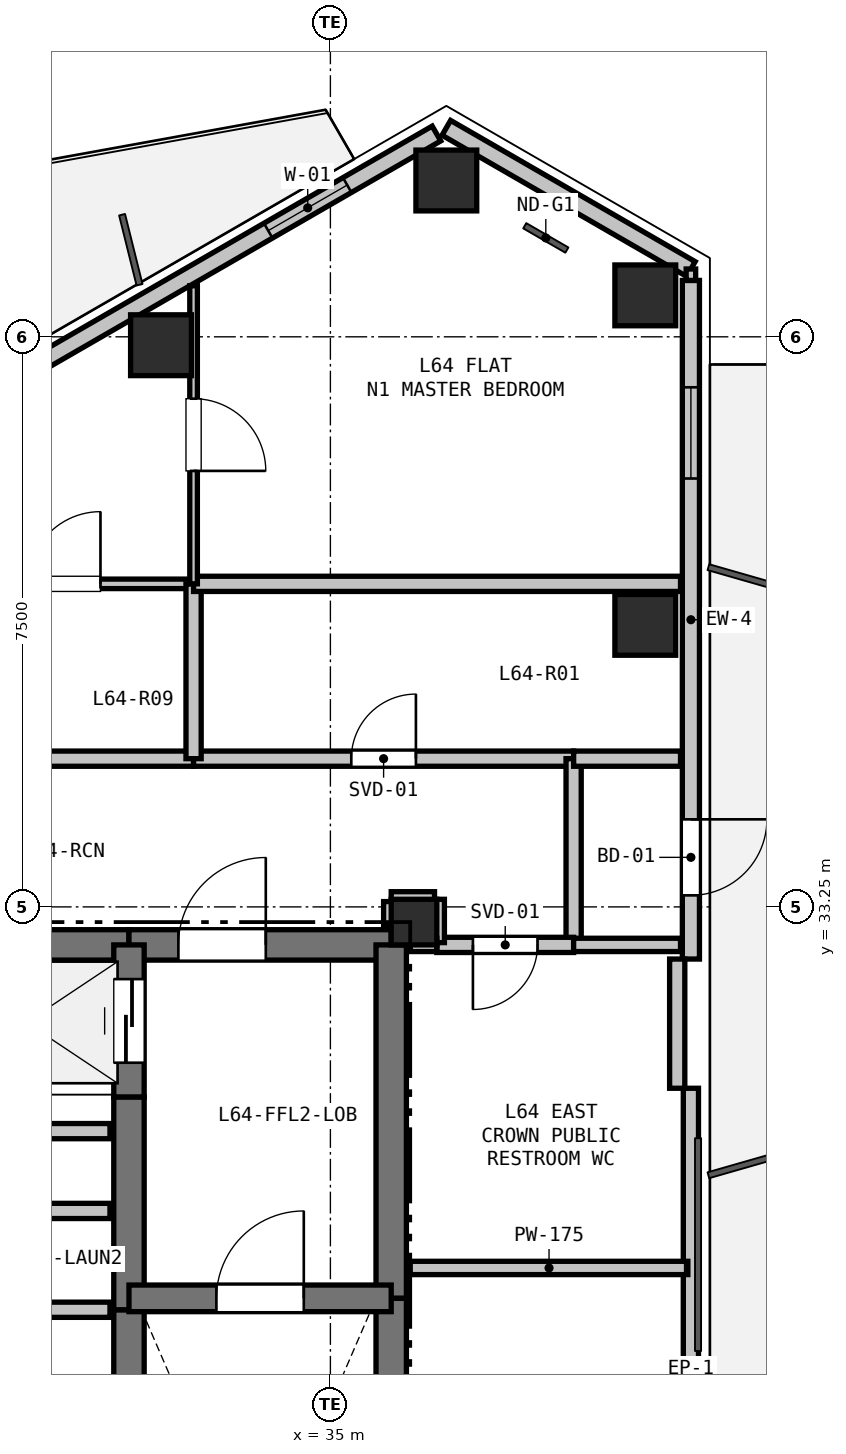
"""IFC4 building model, lengths in metres.
Left out: names, types, materials, properties, quantities, classifications, styles, units other than length and angle.
Written with IfcOpenShell. Run it as: python <this file> out.ifc"""

import sys

from ifc_helpers import new_model, si_unit, direction, frame, frame_2d, origin, origin_2d, place, context, subcontext, project, spatial, rectangle, hollow_rectangle, extrude, element, fill, save


model = new_model("IFC4")
c1 = context("Model", 3, precision=1e-05, world=origin(), true_north=direction((0.0, 1.0)))
c2 = subcontext(c1, "Body", "Model", "MODEL_VIEW")
j1 = project(units=[si_unit("LENGTHUNIT", "METRE"), si_unit("PLANEANGLEUNIT", "RADIAN")], contexts=[c1])
p1 = place(None, origin())
s1 = spatial("IfcSite", under=j1, at=p1, CompositionType="ELEMENT")
p2 = place(p1, origin())
s2 = spatial("IfcBuilding", under=s1, at=p2, CompositionType="ELEMENT")
p3 = place(p2, frame((0.0, 0.0, 229.8)))
s3 = spatial("IfcBuildingStorey", under=s2, at=p3, CompositionType="ELEMENT", Elevation=229.8)
p4 = place(p3, frame((36.1, 33.05, 0.0), z_axis=(0.0, 0.0, 1.0), x_axis=(1.0, 0.0, 0.0)))
e1 = element("IfcColumn", 1, at=p4, inside=s3, PredefinedType="COLUMN", context=c2, shape_type="SweptSolid", body=[
    extrude(rectangle(XDim=0.6, YDim=0.6, at=origin_2d()), origin(), (0.0, 0.0, 1.0), 3.3),
])
for number, where, z_axis, x_axis in (
    (2, (32.771, 40.639, 0.0), (0.0, 0.0, 1.0), (1.0, 0.0, 0.0)),
    (3, (36.525, 42.807, 0.0), (0.0, 0.0, 1.0), (1.0, 0.0, 0.0)),
    (4, (39.143, 41.295, 0.0), (0.0, 0.0, 1.0), (1.0, 0.0, 0.0)),
    (5, (39.143, 36.961, 0.0), (0.0, 0.0, 1.0), (1.0, 0.0, 0.0)),
):
    element("IfcColumn", number, at=place(p3, frame(where, z_axis=z_axis, x_axis=x_axis)), inside=s3, PredefinedType="COLUMN", context=c2, shape_type="SweptSolid", body=[
        extrude(hollow_rectangle(XDim=0.8, YDim=0.8, WallThickness=0.025, at=origin_2d()), origin(), (0.0, 0.0, 1.0), 3.3),
    ])
p5 = place(p3, frame((36.525, 43.5, 0.0), z_axis=(0.0, 0.0, 1.0), x_axis=(0.866038962515, -0.499976514854, 0.0)))
e6 = element("IfcWall", 6, at=p5, inside=s3, PredefinedType="SOLIDWALL", context=c2, shape_type="SweptSolid", body=[
    extrude(rectangle(XDim=3.716, YDim=0.225, at=frame_2d((1.858, 0.0))), origin(), (0.0, 0.0, 1.0), 2.7),
])
p6 = place(p3, frame((28.664, 38.96, 0.0), z_axis=(0.0, 0.0, 1.0), x_axis=(0.866026655105, 0.499997832642, 0.0)))
e7 = element("IfcWall", 7, at=p6, inside=s3, PredefinedType="SOLIDWALL", context=c2, shape_type="SweptSolid", body=[
    extrude(rectangle(XDim=8.928, YDim=0.225, at=frame_2d((4.464, 0.0))), origin(), (0.0, 0.0, 1.0), 2.7),
])
p7 = place(p6, frame((6.372, 0.0, 0.9)))
e8 = element("IfcOpeningElement", 8, at=p7, cuts=e7, PredefinedType="OPENING", context=c2, shape_type="SweptSolid", body=[
    extrude(rectangle(XDim=1.2, YDim=1.4, at=frame_2d((0.6, 0.7))), frame((0.0, 0.123, 0.0), z_axis=(0.0, -1.0, 0.0), x_axis=(1.0, 0.0, 0.0)), (0.0, 0.0, 1.0), 0.245),
])
p8 = place(p3, frame((39.743, 41.492, 0.0), z_axis=(0.0, 0.0, 1.0), x_axis=(0.0, -1.0, 0.0)))
e9 = element("IfcWall", 9, at=p8, inside=s3, PredefinedType="SOLIDWALL", context=c2, shape_type="SweptSolid", body=[
    extrude(rectangle(XDim=8.928, YDim=0.225, at=frame_2d((4.464, 0.0))), origin(), (0.0, 0.0, 1.0), 2.7),
])
p9 = place(p8, frame((7.09, 0.0, 0.0)))
e10 = element("IfcOpeningElement", 10, at=p9, cuts=e9, PredefinedType="OPENING", context=c2, shape_type="SweptSolid", body=[
    extrude(rectangle(XDim=1.0, YDim=2.1, at=frame_2d((0.5, 1.05))), frame((0.0, 0.123, 0.0), z_axis=(0.0, -1.0, 0.0), x_axis=(1.0, 0.0, 0.0)), (0.0, 0.0, 1.0), 0.245),
])
p10 = place(p8, frame((1.406, 0.0, 0.9)))
e11 = element("IfcOpeningElement", 11, at=p10, cuts=e9, PredefinedType="OPENING", context=c2, shape_type="SweptSolid", body=[
    extrude(rectangle(XDim=1.2, YDim=1.4, at=frame_2d((0.6, 0.7))), frame((0.0, 0.123, 0.0), z_axis=(0.0, -1.0, 0.0), x_axis=(1.0, 0.0, 0.0)), (0.0, 0.0, 1.0), 0.245),
])
p11 = place(p3, frame((39.743, 30.864, 0.0), z_axis=(0.0, 0.0, 1.0), x_axis=(0.0, -1.0, 0.0)))
e12 = element("IfcWall", 12, at=p11, inside=s3, PredefinedType="PARAPET", context=c2, shape_type="SweptSolid", body=[
    extrude(rectangle(XDim=8.228, YDim=0.2, at=frame_2d((4.114, 0.0))), origin(), (0.0, 0.0, 1.0), 0.2),
])
p12 = place(p3, frame((39.563, 32.564, 0.0), z_axis=(0.0, 0.0, 1.0), x_axis=(0.0, -1.0, 0.0)))
e13 = element("IfcWall", 13, at=p12, inside=s3, PredefinedType="PARAPET", context=c2, shape_type="SweptSolid", body=[
    extrude(rectangle(XDim=1.7, YDim=0.2, at=frame_2d((0.85, 0.0))), origin(), (0.0, 0.0, 1.0), 2.7),
])
p13 = place(p3, frame((29.65, 32.75, 0.0), z_axis=(0.0, 0.0, 1.0), x_axis=(1.0, 0.0, 0.0)))
e14 = element("IfcWall", 14, at=p13, inside=s3, PredefinedType="SHEAR", context=c2, shape_type="SweptSolid", body=[
    extrude(rectangle(XDim=2.7, YDim=0.4, at=frame_2d((1.35, 0.0))), origin(), (0.0, 0.0, 1.0), 3.08),
])
p14 = place(p3, frame((32.35, 32.75, 0.0), z_axis=(0.0, 0.0, 1.0), x_axis=(1.0, 0.0, 0.0)))
e15 = element("IfcWall", 15, at=p14, inside=s3, PredefinedType="SHEAR", context=c2, shape_type="SweptSolid", body=[
    extrude(rectangle(XDim=3.45, YDim=0.4, at=frame_2d((1.725, 0.0))), origin(), (0.0, 0.0, 1.0), 3.08),
])
p15 = place(p14, frame((0.65, 0.0, 0.0)))
e16 = element("IfcOpeningElement", 16, at=p15, cuts=e15, PredefinedType="OPENING", context=c2, shape_type="SweptSolid", body=[
    extrude(rectangle(XDim=1.15, YDim=2.15, at=frame_2d((0.575, 1.075))), frame((0.0, 0.21, 0.0), z_axis=(0.0, -1.0, 0.0), x_axis=(1.0, 0.0, 0.0)), (0.0, 0.0, 1.0), 0.42),
])
p16 = place(p3, frame((35.8, 32.75, 0.0), z_axis=(0.0, 0.0, 1.0), x_axis=(0.0, -1.0, 0.0)))
e17 = element("IfcWall", 17, at=p16, inside=s3, PredefinedType="SHEAR", context=c2, shape_type="SweptSolid", body=[
    extrude(rectangle(XDim=4.65, YDim=0.4, at=frame_2d((2.325, 0.0))), origin(), (0.0, 0.0, 1.0), 3.08),
])
p17 = place(p3, frame((35.8, 28.1, 0.0), z_axis=(0.0, 0.0, 1.0), x_axis=(0.0, -1.0, 0.0)))
e18 = element("IfcWall", 18, at=p17, inside=s3, PredefinedType="SHEAR", context=c2, shape_type="SweptSolid", body=[
    extrude(rectangle(XDim=7.35, YDim=0.4, at=frame_2d((3.675, 0.0))), origin(), (0.0, 0.0, 1.0), 3.08),
])
p18 = place(p3, frame((32.35, 25.55, 0.0), z_axis=(0.0, 0.0, 1.0), x_axis=(0.0, 1.0, 0.0)))
e19 = element("IfcWall", 19, at=p18, inside=s3, PredefinedType="SHEAR", context=c2, shape_type="SweptSolid", body=[
    extrude(rectangle(XDim=2.4, YDim=0.4, at=frame_2d((1.2, 0.0))), origin(), (0.0, 0.0, 1.0), 3.08),
])
p19 = place(p3, frame((32.35, 27.95, 0.0), z_axis=(0.0, 0.0, 1.0), x_axis=(0.0, 1.0, 0.0)))
e20 = element("IfcWall", 20, at=p19, inside=s3, PredefinedType="SHEAR", context=c2, shape_type="SweptSolid", body=[
    extrude(rectangle(XDim=2.8, YDim=0.4, at=frame_2d((1.4, 0.0))), origin(), (0.0, 0.0, 1.0), 3.08),
])
p20 = place(p3, frame((32.35, 30.75, 0.0), z_axis=(0.0, 0.0, 1.0), x_axis=(0.0, 1.0, 0.0)))
e21 = element("IfcWall", 21, at=p20, inside=s3, PredefinedType="SHEAR", context=c2, shape_type="SweptSolid", body=[
    extrude(rectangle(XDim=2.0, YDim=0.4, at=frame_2d((1.0, 0.0))), origin(), (0.0, 0.0, 1.0), 3.08),
])
p21 = place(p20, frame((0.45, 0.0, 0.0)))
e22 = element("IfcOpeningElement", 22, at=p21, cuts=e21, PredefinedType="OPENING", context=c2, shape_type="SweptSolid", body=[
    extrude(rectangle(XDim=1.1, YDim=2.15, at=frame_2d((0.55, 1.075))), frame((0.0, 0.21, 0.0), z_axis=(0.0, -1.0, 0.0), x_axis=(1.0, 0.0, 0.0)), (0.0, 0.0, 1.0), 0.42),
])
p22 = place(p3, frame((32.35, 28.1, 0.0), z_axis=(0.0, 0.0, 1.0), x_axis=(1.0, 0.0, 0.0)))
e23 = element("IfcWall", 23, at=p22, inside=s3, PredefinedType="SHEAR", context=c2, shape_type="SweptSolid", body=[
    extrude(rectangle(XDim=3.45, YDim=0.35, at=frame_2d((1.725, 0.0))), origin(), (0.0, 0.0, 1.0), 3.08),
])
p23 = place(p22, frame((1.15, 0.0, 0.0)))
e24 = element("IfcOpeningElement", 24, at=p23, cuts=e23, PredefinedType="OPENING", context=c2, shape_type="SweptSolid", body=[
    extrude(rectangle(XDim=1.15, YDim=2.15, at=frame_2d((0.575, 1.075))), frame((0.0, 0.185, 0.0), z_axis=(0.0, -1.0, 0.0), x_axis=(1.0, 0.0, 0.0)), (0.0, 0.0, 1.0), 0.37),
])
p24 = place(p3, frame((32.1, 30.3, 0.0), z_axis=(0.0, 0.0, 1.0), x_axis=(-1.0, 0.0, 0.0)))
e25 = element("IfcWall", 25, at=p24, inside=s3, PredefinedType="PARTITIONING", context=c2, shape_type="SweptSolid", body=[
    extrude(rectangle(XDim=2.45, YDim=0.2, at=frame_2d((1.225, 0.0))), origin(), (0.0, 0.0, 1.0), 3.08),
])
p25 = place(p3, frame((27.4, 27.95, 0.0), z_axis=(0.0, 0.0, 1.0), x_axis=(1.0, 0.0, 0.0)))
e26 = element("IfcWall", 26, at=p25, inside=s3, PredefinedType="PARTITIONING", context=c2, shape_type="SweptSolid", body=[
    extrude(rectangle(XDim=4.7, YDim=0.2, at=frame_2d((2.35, 0.0))), origin(), (0.0, 0.0, 1.0), 3.08),
])
p26 = place(p25, frame((1.85, 0.0, 0.0)))
e27 = element("IfcOpeningElement", 27, at=p26, cuts=e26, PredefinedType="OPENING", context=c2, shape_type="SweptSolid", body=[
    extrude(rectangle(XDim=1.0, YDim=2.15, at=frame_2d((0.5, 1.075))), frame((0.0, 0.11, 0.0), z_axis=(0.0, -1.0, 0.0), x_axis=(1.0, 0.0, 0.0)), (0.0, 0.0, 1.0), 0.22),
])
p27 = place(p3, frame((29.8, 35.2, 0.0), z_axis=(0.0, 0.0, 1.0), x_axis=(1.0, 0.0, 0.0)))
e28 = element("IfcWall", 28, at=p27, inside=s3, PredefinedType="PARTITIONING", context=c2, shape_type="SweptSolid", body=[
    extrude(rectangle(XDim=3.4, YDim=0.2, at=frame_2d((1.7, 0.0))), origin(), (0.0, 0.0, 1.0), 3.08),
])
p28 = place(p3, frame((33.2, 35.2, 0.0), z_axis=(0.0, 0.0, 1.0), x_axis=(1.0, 0.0, 0.0)))
e29 = element("IfcWall", 29, at=p28, inside=s3, PredefinedType="PARTITIONING", context=c2, shape_type="SweptSolid", body=[
    extrude(rectangle(XDim=5.0, YDim=0.2, at=frame_2d((2.5, 0.0))), origin(), (0.0, 0.0, 1.0), 2.528),
])
p29 = place(p28, frame((2.075, 0.0, 0.0)))
e30 = element("IfcOpeningElement", 30, at=p29, cuts=e29, PredefinedType="OPENING", context=c2, shape_type="SweptSolid", body=[
    extrude(rectangle(XDim=0.85, YDim=2.1, at=frame_2d((0.425, 1.05))), frame((0.0, 0.11, 0.0), z_axis=(0.0, -1.0, 0.0), x_axis=(1.0, 0.0, 0.0)), (0.0, 0.0, 1.0), 0.22),
])
p30 = place(p3, frame((38.2, 35.2, 0.0), z_axis=(0.0, 0.0, 1.0), x_axis=(0.0, -1.0, 0.0)))
e31 = element("IfcWall", 31, at=p30, inside=s3, PredefinedType="PARTITIONING", context=c2, shape_type="SweptSolid", body=[
    extrude(rectangle(XDim=2.45, YDim=0.2, at=frame_2d((1.225, 0.0))), origin(), (0.0, 0.0, 1.0), 3.08),
])
p31 = place(p3, frame((38.2, 32.75, 0.0), z_axis=(0.0, 0.0, 1.0), x_axis=(-1.0, 0.0, 0.0)))
e32 = element("IfcWall", 32, at=p31, inside=s3, PredefinedType="PARTITIONING", context=c2, shape_type="SweptSolid", body=[
    extrude(rectangle(XDim=1.8, YDim=0.2, at=frame_2d((0.9, 0.0))), origin(), (0.0, 0.0, 1.0), 3.08),
])
p32 = place(p31, frame((0.475, 0.0, 0.0)))
e33 = element("IfcOpeningElement", 33, at=p32, cuts=e32, PredefinedType="OPENING", context=c2, shape_type="SweptSolid", body=[
    extrude(rectangle(XDim=0.85, YDim=2.1, at=frame_2d((0.425, 1.05))), frame((0.0, 0.11, 0.0), z_axis=(0.0, -1.0, 0.0), x_axis=(1.0, 0.0, 0.0)), (0.0, 0.0, 1.0), 0.22),
])
for number, where, z_axis, x_axis in (
    (34, (36.4, 32.78, 0.0), (0.0, 0.0, 1.0), (0.0, 1.0, 0.0)),
    (35, (36.37, 33.35, 0.0), (0.0, 0.0, 1.0), (-1.0, 0.0, 0.0)),
):
    element("IfcWall", number, at=place(p3, frame(where, z_axis=z_axis, x_axis=x_axis)), inside=s3, PredefinedType="PARTITIONING", context=c2, shape_type="SweptSolid", body=[
        extrude(rectangle(XDim=0.57, YDim=0.2, at=frame_2d((0.285, 0.0))), origin(), (0.0, 0.0, 1.0), 2.528),
    ])
p33 = place(p3, frame((35.8, 33.32, 0.0), z_axis=(0.0, 0.0, 1.0), x_axis=(0.0, -1.0, 0.0)))
e36 = element("IfcWall", 36, at=p33, inside=s3, PredefinedType="PARTITIONING", context=c2, shape_type="SweptSolid", body=[
    extrude(rectangle(XDim=0.32, YDim=0.2, at=frame_2d((0.16, 0.0))), origin(), (0.0, 0.0, 1.0), 2.605),
])
p34 = place(p3, frame((36.05, 32.75, 0.0), z_axis=(0.0, 0.0, 1.0), x_axis=(1.0, 0.0, 0.0)))
e37 = element("IfcWall", 37, at=p34, inside=s3, PredefinedType="PLUMBINGWALL", context=c2, shape_type="SweptSolid", body=[
    extrude(rectangle(XDim=0.35, YDim=0.175, at=frame_2d((0.175, 0.0))), origin(), (0.0, 0.0, 1.0), 2.605),
])
p35 = place(p3, frame((38.2, 32.75, 0.0), z_axis=(0.0, 0.0, 1.0), x_axis=(1.0, 0.0, 0.0)))
e38 = element("IfcWall", 38, at=p35, inside=s3, PredefinedType="PLUMBINGWALL", context=c2, shape_type="SweptSolid", body=[
    extrude(rectangle(XDim=1.406, YDim=0.175, at=frame_2d((0.703, 0.0))), origin(), (0.0, 0.0, 1.0), 2.365),
])
p36 = place(p3, frame((39.703, 28.5, 0.0), z_axis=(0.0, 0.0, 1.0), x_axis=(-1.0, 0.0, 0.0)))
e39 = element("IfcWall", 39, at=p36, inside=s3, PredefinedType="PLUMBINGWALL", context=c2, shape_type="SweptSolid", body=[
    extrude(rectangle(XDim=3.653, YDim=0.175, at=frame_2d((1.826, 0.0))), origin(), (0.0, 0.0, 1.0), 2.365),
])
p37 = place(p3, frame((29.8, 37.5, 0.0), z_axis=(0.0, 0.0, 1.0), x_axis=(1.0, 0.0, 0.0)))
e40 = element("IfcWall", 40, at=p37, inside=s3, PredefinedType="PARTITIONING", context=c2, shape_type="SweptSolid", body=[
    extrude(rectangle(XDim=3.4, YDim=0.125, at=frame_2d((1.7, 0.0))), origin(), (0.0, 0.0, 1.0), 3.08),
])
p38 = place(p37, frame((1.225, 0.0, 0.0)))
e41 = element("IfcOpeningElement", 41, at=p38, cuts=e40, PredefinedType="OPENING", context=c2, shape_type="SweptSolid", body=[
    extrude(rectangle(XDim=0.95, YDim=2.1, at=frame_2d((0.475, 1.05))), frame((0.0, 0.073, 0.0), z_axis=(0.0, -1.0, 0.0), x_axis=(1.0, 0.0, 0.0)), (0.0, 0.0, 1.0), 0.145),
])
p39 = place(p3, frame((33.2, 37.5, 0.0), z_axis=(0.0, 0.0, 1.0), x_axis=(0.0, -1.0, 0.0)))
e42 = element("IfcWall", 42, at=p39, inside=s3, PredefinedType="PARTITIONING", context=c2, shape_type="SweptSolid", body=[
    extrude(rectangle(XDim=2.3, YDim=0.2, at=frame_2d((1.15, 0.0))), origin(), (0.0, 0.0, 1.0), 3.08),
])
p40 = place(p3, frame((32.1, 29.25, 0.0), z_axis=(0.0, 0.0, 1.0), x_axis=(-1.0, 0.0, 0.0)))
e43 = element("IfcWall", 43, at=p40, inside=s3, PredefinedType="PARTITIONING", context=c2, shape_type="SweptSolid", body=[
    extrude(rectangle(XDim=4.7, YDim=0.2, at=frame_2d((2.35, 0.0))), origin(), (0.0, 0.0, 1.0), 3.08),
])
p41 = place(p3, frame((39.606, 35.2, 0.0), z_axis=(0.0, 0.0, 1.0), x_axis=(-1.0, 0.0, 0.0)))
e44 = element("IfcWall", 44, at=p41, inside=s3, PredefinedType="PARTITIONING", context=c2, shape_type="SweptSolid", body=[
    extrude(rectangle(XDim=1.406, YDim=0.2, at=frame_2d((0.703, 0.0))), origin(), (0.0, 0.0, 1.0), 2.365),
])
p42 = place(p3, frame((33.2, 37.5, 0.0), z_axis=(0.0, 0.0, 1.0), x_axis=(1.0, 0.0, 0.0)))
e45 = element("IfcWall", 45, at=p42, inside=s3, PredefinedType="PARTITIONING", context=c2, shape_type="SweptSolid", body=[
    extrude(rectangle(XDim=6.406, YDim=0.2, at=frame_2d((3.203, 0.0))), origin(), (0.0, 0.0, 1.0), 2.528),
])
p43 = place(p3, frame((33.2, 41.422, 0.0), z_axis=(0.0, 0.0, 1.0), x_axis=(0.0, -1.0, 0.0)))
e46 = element("IfcWall", 46, at=p43, inside=s3, PredefinedType="PARTITIONING", context=c2, shape_type="SweptSolid", body=[
    extrude(rectangle(XDim=3.922, YDim=0.1, at=frame_2d((1.961, 0.0))), origin(), (0.0, 0.0, 1.0), 2.805),
])
p44 = place(p43, frame((1.486, 0.0, 0.0)))
e47 = element("IfcOpeningElement", 47, at=p44, cuts=e46, PredefinedType="OPENING", context=c2, shape_type="SweptSolid", body=[
    extrude(rectangle(XDim=0.95, YDim=2.1, at=frame_2d((0.475, 1.05))), frame((0.0, 0.06, 0.0), z_axis=(0.0, -1.0, 0.0), x_axis=(1.0, 0.0, 0.0)), (0.0, 0.0, 1.0), 0.12),
])
p45 = place(p3, frame((39.743, 41.642, 0.0), z_axis=(0.0, 0.0, 1.0), x_axis=(0.0, -1.0, 0.0)))
e48 = element("IfcWall", 48, at=p45, inside=s3, PredefinedType="PARTITIONING", context=c2, shape_type="SweptSolid", body=[
    extrude(rectangle(XDim=0.15, YDim=0.125, at=frame_2d((0.075, 0.0))), origin(), (0.0, 0.0, 1.0), 3.08),
])
p46 = place(p7, origin())
e49 = element("IfcWindow", 49, at=p46, inside=s3, PartitioningType="SINGLE_PANEL", PredefinedType="WINDOW", context=c2, shape_type="SweptSolid", body=[
    extrude(rectangle(XDim=1.2, YDim=1.4, at=frame_2d((0.6, 0.7))), frame((0.0, 0.03, 0.0), z_axis=(0.0, -1.0, 0.0), x_axis=(1.0, 0.0, 0.0)), (0.0, 0.0, 1.0), 0.06),
])
fill(e8, e49)
p47 = place(p9, origin())
e50 = element("IfcDoor", 50, at=p47, inside=s3, OperationType="SINGLE_SWING_LEFT", PredefinedType="DOOR", context=c2, shape_type="SweptSolid", body=[
    extrude(rectangle(XDim=1.0, YDim=2.1, at=frame_2d((0.5, 1.05))), frame((0.0, 0.025, 0.0), z_axis=(0.0, -1.0, 0.0), x_axis=(1.0, 0.0, 0.0)), (0.0, 0.0, 1.0), 0.05),
])
fill(e10, e50)
p48 = place(p10, origin())
e51 = element("IfcWindow", 51, at=p48, inside=s3, PartitioningType="SINGLE_PANEL", PredefinedType="WINDOW", context=c2, shape_type="SweptSolid", body=[
    extrude(rectangle(XDim=1.2, YDim=1.4, at=frame_2d((0.6, 0.7))), frame((0.0, 0.03, 0.0), z_axis=(0.0, -1.0, 0.0), x_axis=(1.0, 0.0, 0.0)), (0.0, 0.0, 1.0), 0.06),
])
fill(e11, e51)
p49 = place(p21, origin())
e52 = element("IfcDoor", 52, at=p49, inside=s3, OperationType="SLIDING_TO_LEFT", PredefinedType="DOOR", context=c2, shape_type="SweptSolid", body=[
    extrude(rectangle(XDim=1.1, YDim=2.15, at=frame_2d((0.55, 1.075))), frame((0.0, 0.025, 0.0), z_axis=(0.0, -1.0, 0.0), x_axis=(1.0, 0.0, 0.0)), (0.0, 0.0, 1.0), 0.05),
])
fill(e22, e52)
p50 = place(p23, origin())
e53 = element("IfcDoor", 53, at=p50, inside=s3, OperationType="SINGLE_SWING_RIGHT", PredefinedType="DOOR", context=c2, shape_type="SweptSolid", body=[
    extrude(rectangle(XDim=1.15, YDim=2.15, at=frame_2d((0.575, 1.075))), frame((0.0, 0.025, 0.0), z_axis=(0.0, -1.0, 0.0), x_axis=(1.0, 0.0, 0.0)), (0.0, 0.0, 1.0), 0.05),
])
fill(e24, e53)
p51 = place(p15, origin())
e54 = element("IfcDoor", 54, at=p51, inside=s3, OperationType="SINGLE_SWING_RIGHT", PredefinedType="DOOR", context=c2, shape_type="SweptSolid", body=[
    extrude(rectangle(XDim=1.15, YDim=2.15, at=frame_2d((0.575, 1.075))), frame((0.0, 0.025, 0.0), z_axis=(0.0, -1.0, 0.0), x_axis=(1.0, 0.0, 0.0)), (0.0, 0.0, 1.0), 0.05),
])
fill(e16, e54)
p52 = place(p32, origin())
e55 = element("IfcDoor", 55, at=p52, inside=s3, OperationType="SINGLE_SWING_RIGHT", PredefinedType="DOOR", context=c2, shape_type="SweptSolid", body=[
    extrude(rectangle(XDim=0.85, YDim=2.1, at=frame_2d((0.425, 1.05))), frame((0.0, 0.025, 0.0), z_axis=(0.0, -1.0, 0.0), x_axis=(1.0, 0.0, 0.0)), (0.0, 0.0, 1.0), 0.05),
])
fill(e33, e55)
p53 = place(p29, origin())
e56 = element("IfcDoor", 56, at=p53, inside=s3, OperationType="SINGLE_SWING_RIGHT", PredefinedType="DOOR", context=c2, shape_type="SweptSolid", body=[
    extrude(rectangle(XDim=0.85, YDim=2.1, at=frame_2d((0.425, 1.05))), frame((0.0, 0.025, 0.0), z_axis=(0.0, -1.0, 0.0), x_axis=(1.0, 0.0, 0.0)), (0.0, 0.0, 1.0), 0.05),
])
fill(e30, e56)
p54 = place(p38, origin())
e57 = element("IfcDoor", 57, at=p54, inside=s3, OperationType="SINGLE_SWING_RIGHT", PredefinedType="DOOR", context=c2, shape_type="SweptSolid", body=[
    extrude(rectangle(XDim=0.95, YDim=2.1, at=frame_2d((0.475, 1.05))), frame((0.0, 0.025, 0.0), z_axis=(0.0, -1.0, 0.0), x_axis=(1.0, 0.0, 0.0)), (0.0, 0.0, 1.0), 0.05),
])
fill(e41, e57)
p55 = place(p44, origin())
e58 = element("IfcDoor", 58, at=p55, inside=s3, OperationType="SINGLE_SWING_RIGHT", PredefinedType="DOOR", context=c2, shape_type="SweptSolid", body=[
    extrude(rectangle(XDim=0.95, YDim=2.1, at=frame_2d((0.475, 1.05))), frame((0.0, 0.025, 0.0), z_axis=(0.0, -1.0, 0.0), x_axis=(1.0, 0.0, 0.0)), (0.0, 0.0, 1.0), 0.05),
])
fill(e47, e58)
save(model, sys.argv[1])
